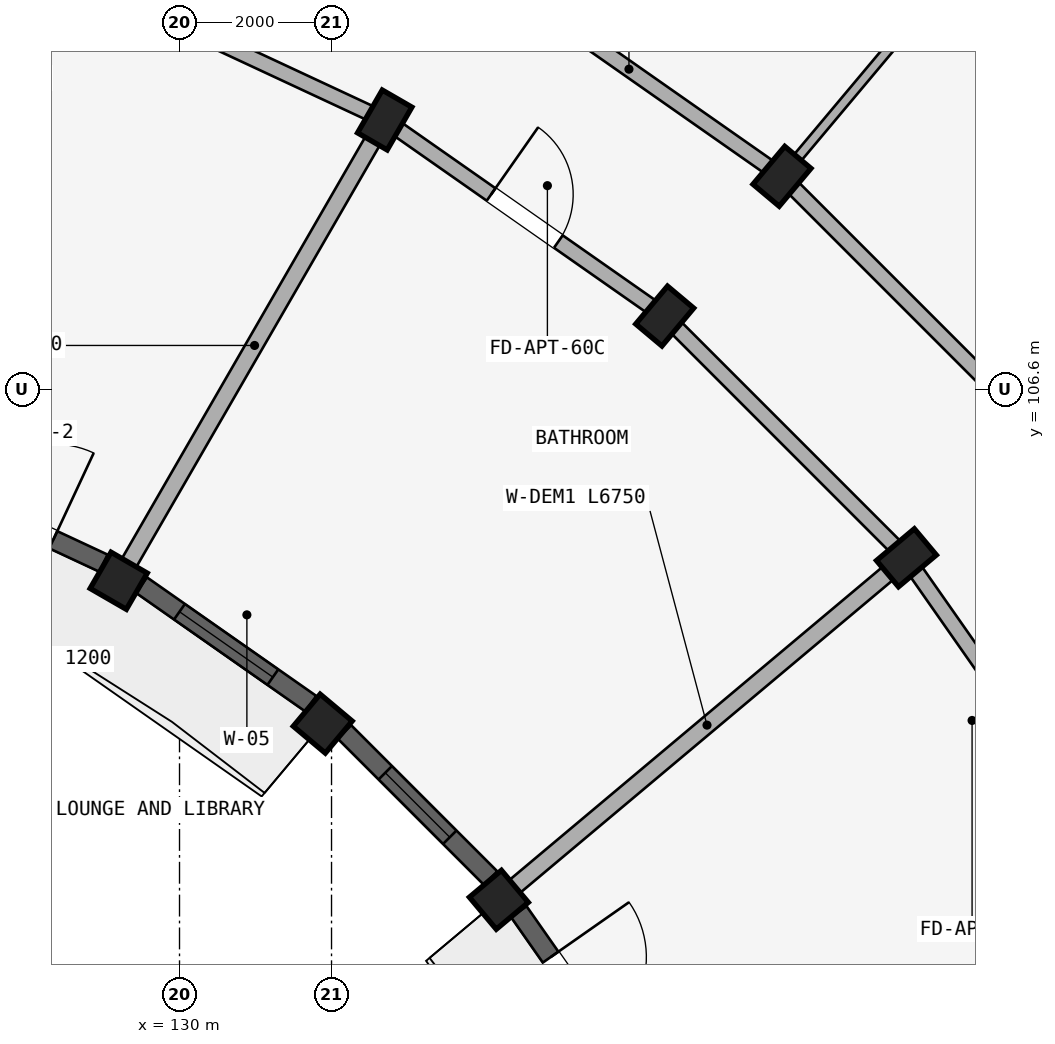
"""IFC4 building model, lengths in metres.
Left out: names, types, materials, properties, quantities, classifications, styles, units other than length and angle.
Written with IfcOpenShell. Run it as: python <this file> out.ifc"""

import sys

from ifc_helpers import new_model, si_unit, direction, frame, frame_2d, origin, origin_2d, place, context, subcontext, project, spatial, rectangle, extrude, element, fill, save


model = new_model("IFC4")
c1 = context("Model", 3, precision=1e-05, world=origin(), true_north=direction((0.0, 1.0)))
c2 = subcontext(c1, "Body", "Model", "MODEL_VIEW")
j1 = project(units=[si_unit("LENGTHUNIT", "METRE"), si_unit("PLANEANGLEUNIT", "RADIAN")], contexts=[c1])
p1 = place(None, origin())
s1 = spatial("IfcSite", under=j1, at=p1, CompositionType="ELEMENT")
p2 = place(p1, origin())
s2 = spatial("IfcBuilding", under=s1, at=p2, CompositionType="ELEMENT")
p3 = place(p2, frame((0.0, 0.0, 33.9)))
s3 = spatial("IfcBuildingStorey", under=s2, at=p3, CompositionType="ELEMENT", Elevation=33.9)
p4 = place(p3, frame((129.2, 104.081, 0.0), z_axis=(0.0, 0.0, 1.0), x_axis=(-0.866025403784, 0.5, 0.0)))
e1 = element("IfcColumn", 1, at=p4, inside=s3, PredefinedType="COLUMN", context=c2, shape_type="SweptSolid", body=[
    extrude(rectangle(XDim=0.55, YDim=0.55, at=origin_2d()), origin(), (0.0, 0.0, 1.0), 2.93),
])
p5 = place(p3, frame((132.7, 110.144, 0.0), z_axis=(0.0, 0.0, 1.0), x_axis=(-0.866025403784, 0.5, 0.0)))
e2 = element("IfcColumn", 2, at=p5, inside=s3, PredefinedType="COLUMN", context=c2, shape_type="SweptSolid", body=[
    extrude(rectangle(XDim=0.45, YDim=0.65, at=origin_2d()), origin(), (0.0, 0.0, 1.0), 2.93),
])
p6 = place(p3, frame((131.885, 102.202, 0.0), z_axis=(0.0, 0.0, 1.0), x_axis=(-0.766044443119, 0.642787609687, 0.0)))
e3 = element("IfcColumn", 3, at=p6, inside=s3, PredefinedType="COLUMN", context=c2, shape_type="SweptSolid", body=[
    extrude(rectangle(XDim=0.55, YDim=0.55, at=origin_2d()), origin(), (0.0, 0.0, 1.0), 2.93),
])
for number, where, z_axis, x_axis in (
    (4, (136.384, 107.564, 0.0), (0.0, 0.0, 1.0), (-0.766, 0.643, 0.0)),
    (5, (137.927, 109.402, 0.0), (0.0, 0.0, 1.0), (-0.766, 0.643, 0.0)),
):
    element("IfcColumn", number, at=place(p3, frame(where, z_axis=z_axis, x_axis=x_axis)), inside=s3, PredefinedType="COLUMN", context=c2, shape_type="SweptSolid", body=[
        extrude(rectangle(XDim=0.45, YDim=0.65, at=origin_2d()), origin(), (0.0, 0.0, 1.0), 2.93),
    ])
p7 = place(p3, frame((134.202, 99.885, 0.0), z_axis=(0.0, 0.0, 1.0), x_axis=(-0.642787609687, 0.766044443119, 0.0)))
e6 = element("IfcColumn", 6, at=p7, inside=s3, PredefinedType="COLUMN", context=c2, shape_type="SweptSolid", body=[
    extrude(rectangle(XDim=0.55, YDim=0.55, at=origin_2d()), origin(), (0.0, 0.0, 1.0), 2.93),
])
p8 = place(p3, frame((139.564, 104.384, 0.0), z_axis=(0.0, 0.0, 1.0), x_axis=(-0.642787609687, 0.766044443119, 0.0)))
e7 = element("IfcColumn", 7, at=p8, inside=s3, PredefinedType="COLUMN", context=c2, shape_type="SweptSolid", body=[
    extrude(rectangle(XDim=0.45, YDim=0.65, at=origin_2d()), origin(), (0.0, 0.0, 1.0), 2.93),
])
p9 = place(p3, frame((128.624, 112.044, 0.0), z_axis=(0.0, 0.0, 1.0), x_axis=(0.906307919131, -0.422617978463, 0.0)))
e8 = element("IfcWall", 8, at=p9, inside=s3, PredefinedType="STANDARD", context=c2, shape_type="SweptSolid", body=[
    extrude(rectangle(XDim=4.497, YDim=0.2, at=frame_2d((2.249, 0.0))), origin(), (0.0, 0.0, 1.0), 2.372),
])
p10 = place(p3, frame((132.7, 110.144, 0.0), z_axis=(0.0, 0.0, 1.0), x_axis=(0.819155404658, -0.573571637217, 0.0)))
e9 = element("IfcWall", 9, at=p10, inside=s3, PredefinedType="STANDARD", context=c2, shape_type="SweptSolid", body=[
    extrude(rectangle(XDim=4.497, YDim=0.2, at=frame_2d((2.249, 0.0))), origin(), (0.0, 0.0, 1.0), 2.372),
])
p11 = place(p10, frame((1.709, 0.0, 0.0)))
e10 = element("IfcOpeningElement", 10, at=p11, cuts=e9, PredefinedType="OPENING", context=c2, shape_type="SweptSolid", body=[
    extrude(rectangle(XDim=1.08, YDim=2.15, at=frame_2d((0.54, 1.075))), frame((0.0, 0.11, 0.0), z_axis=(0.0, -1.0, 0.0), x_axis=(1.0, 0.0, 0.0)), (0.0, 0.0, 1.0), 0.22),
])
p12 = place(p3, frame((133.9, 112.222, 0.0), z_axis=(0.0, 0.0, 1.0), x_axis=(0.819140911474, -0.573592335331, 0.0)))
e11 = element("IfcWall", 11, at=p12, inside=s3, PredefinedType="STANDARD", context=c2, shape_type="SweptSolid", body=[
    extrude(rectangle(XDim=4.916, YDim=0.2, at=frame_2d((2.458, 0.0))), origin(), (0.0, 0.0, 1.0), 2.372),
])
p13 = place(p3, frame((136.384, 107.564, 0.0), z_axis=(0.0, 0.0, 1.0), x_axis=(0.707106781187, -0.707106781187, 0.0)))
e12 = element("IfcWall", 12, at=p13, inside=s3, PredefinedType="STANDARD", context=c2, shape_type="SweptSolid", body=[
    extrude(rectangle(XDim=4.497, YDim=0.2, at=frame_2d((2.249, 0.0))), origin(), (0.0, 0.0, 1.0), 2.372),
])
p14 = place(p3, frame((137.927, 109.402, 0.0), z_axis=(0.0, 0.0, 1.0), x_axis=(0.707106781187, -0.707106781187, 0.0)))
e13 = element("IfcWall", 13, at=p14, inside=s3, PredefinedType="STANDARD", context=c2, shape_type="SweptSolid", body=[
    extrude(rectangle(XDim=4.916, YDim=0.2, at=frame_2d((2.458, 0.0))), origin(), (0.0, 0.0, 1.0), 2.372),
])
p15 = place(p3, frame((139.564, 104.384, 0.0), z_axis=(0.0, 0.0, 1.0), x_axis=(0.573571637217, -0.819155404658, 0.0)))
e14 = element("IfcWall", 14, at=p15, inside=s3, PredefinedType="STANDARD", context=c2, shape_type="SweptSolid", body=[
    extrude(rectangle(XDim=4.497, YDim=0.2, at=frame_2d((2.249, 0.0))), origin(), (0.0, 0.0, 1.0), 2.372),
])
p16 = place(p15, frame((1.749, 0.0, 0.0)))
e15 = element("IfcOpeningElement", 15, at=p16, cuts=e14, PredefinedType="OPENING", context=c2, shape_type="SweptSolid", body=[
    extrude(rectangle(XDim=1.0, YDim=2.15, at=frame_2d((0.5, 1.075))), frame((0.0, 0.11, 0.0), z_axis=(0.0, -1.0, 0.0), x_axis=(1.0, 0.0, 0.0)), (0.0, 0.0, 1.0), 0.22),
])
p17 = place(p3, frame((129.3, 104.254, 0.0), z_axis=(0.0, 0.0, 1.0), x_axis=(0.499997969693, 0.866026575979, 0.0)))
e16 = element("IfcWall", 16, at=p17, inside=s3, PredefinedType="STANDARD", context=c2, shape_type="SweptSolid", body=[
    extrude(rectangle(XDim=6.75, YDim=0.22, at=frame_2d((3.375, 0.0))), origin(), (0.0, 0.0, 1.0), 2.372),
])
p18 = place(p3, frame((137.991, 109.479, 0.0), z_axis=(0.0, 0.0, 1.0), x_axis=(0.642781220531, 0.766049804211, 0.0)))
e17 = element("IfcWall", 17, at=p18, inside=s3, PredefinedType="PARTITIONING", context=c2, shape_type="SweptSolid", body=[
    extrude(rectangle(XDim=11.82, YDim=0.125, at=frame_2d((5.91, 0.0))), origin(), (0.0, 0.0, 1.0), 2.372),
])
p19 = place(p18, frame((7.5, 0.0, 0.0)))
e18 = element("IfcOpeningElement", 18, at=p19, cuts=e17, PredefinedType="OPENING", context=c2, shape_type="SweptSolid", body=[
    extrude(rectangle(XDim=0.8, YDim=2.1, at=frame_2d((0.4, 1.05))), frame((0.0, 0.073, 0.0), z_axis=(0.0, -1.0, 0.0), x_axis=(1.0, 0.0, 0.0)), (0.0, 0.0, 1.0), 0.145),
])
p20 = place(p3, frame((134.355, 100.013, 0.0), z_axis=(0.0, 0.0, 1.0), x_axis=(0.766046761698, 0.642784846501, 0.0)))
e19 = element("IfcWall", 19, at=p20, inside=s3, PredefinedType="STANDARD", context=c2, shape_type="SweptSolid", body=[
    extrude(rectangle(XDim=6.75, YDim=0.22, at=frame_2d((3.375, 0.0))), origin(), (0.0, 0.0, 1.0), 2.372),
])
p21 = place(p3, frame((140.08, 111.969, 0.0), z_axis=(0.0, 0.0, 1.0), x_axis=(0.707106781187, -0.707106781187, 0.0)))
e20 = element("IfcWall", 20, at=p21, inside=s3, PredefinedType="PLUMBINGWALL", context=c2, shape_type="SweptSolid", body=[
    extrude(rectangle(XDim=5.5, YDim=0.15, at=frame_2d((2.75, 0.0))), origin(), (0.0, 0.0, 1.0), 2.372),
])
p22 = place(p21, frame((2.37, 0.0, 0.0)))
e21 = element("IfcOpeningElement", 21, at=p22, cuts=e20, PredefinedType="OPENING", context=c2, shape_type="SweptSolid", body=[
    extrude(rectangle(XDim=0.76, YDim=2.05, at=frame_2d((0.38, 1.025))), frame((0.0, 0.085, 0.0), z_axis=(0.0, -1.0, 0.0), x_axis=(1.0, 0.0, 0.0)), (0.0, 0.0, 1.0), 0.17),
])
p23 = place(p3, frame((126.535, 105.462, 0.0), z_axis=(0.0, 0.0, 1.0), x_axis=(0.906302358412, -0.422629903269, 0.0)))
e22 = element("IfcWall", 22, at=p23, inside=s3, PredefinedType="STANDARD", context=c2, shape_type="SweptSolid", body=[
    extrude(rectangle(XDim=2.72, YDim=0.25, at=frame_2d((1.36, 0.0))), origin(), (0.0, 0.0, 1.0), 2.472),
])
p24 = place(p23, frame((0.73, 0.0, 0.0)))
e23 = element("IfcOpeningElement", 23, at=p24, cuts=e22, PredefinedType="OPENING", context=c2, shape_type="SweptSolid", body=[
    extrude(rectangle(XDim=1.26, YDim=2.15, at=frame_2d((0.63, 1.075))), frame((0.0, 0.135, 0.0), z_axis=(0.0, -1.0, 0.0), x_axis=(1.0, 0.0, 0.0)), (0.0, 0.0, 1.0), 0.27),
])
p25 = place(p3, frame((129.5, 104.024, 0.0), z_axis=(0.0, 0.0, 1.0), x_axis=(0.819126475299, -0.573612950921, 0.0)))
e24 = element("IfcWall", 24, at=p25, inside=s3, PredefinedType="STANDARD", context=c2, shape_type="SweptSolid", body=[
    extrude(rectangle(XDim=2.72, YDim=0.25, at=frame_2d((1.36, 0.0))), origin(), (0.0, 0.0, 1.0), 2.472),
])
p26 = place(p25, frame((0.61, 0.0, 0.622)))
e25 = element("IfcOpeningElement", 25, at=p26, cuts=e24, PredefinedType="OPENING", context=c2, shape_type="SweptSolid", body=[
    extrude(rectangle(XDim=1.5, YDim=1.65, at=frame_2d((0.75, 0.825))), frame((0.0, 0.135, 0.0), z_axis=(0.0, -1.0, 0.0), x_axis=(1.0, 0.0, 0.0)), (0.0, 0.0, 1.0), 0.27),
])
p27 = place(p3, frame((132.17, 102.093, 0.0), z_axis=(0.0, 0.0, 1.0), x_axis=(0.707106781187, -0.707106781187, 0.0)))
e26 = element("IfcWall", 26, at=p27, inside=s3, PredefinedType="STANDARD", context=c2, shape_type="SweptSolid", body=[
    extrude(rectangle(XDim=2.72, YDim=0.25, at=frame_2d((1.36, 0.0))), origin(), (0.0, 0.0, 1.0), 2.472),
])
p28 = place(p27, frame((0.76, 0.0, 0.772)))
e27 = element("IfcOpeningElement", 27, at=p28, cuts=e26, PredefinedType="OPENING", context=c2, shape_type="SweptSolid", body=[
    extrude(rectangle(XDim=1.2, YDim=1.5, at=frame_2d((0.6, 0.75))), frame((0.0, 0.135, 0.0), z_axis=(0.0, -1.0, 0.0), x_axis=(1.0, 0.0, 0.0)), (0.0, 0.0, 1.0), 0.27),
])
p29 = place(p3, frame((134.464, 99.728, 0.0), z_axis=(0.0, 0.0, 1.0), x_axis=(0.573612950921, -0.819126475299, 0.0)))
e28 = element("IfcWall", 28, at=p29, inside=s3, PredefinedType="STANDARD", context=c2, shape_type="SweptSolid", body=[
    extrude(rectangle(XDim=2.72, YDim=0.25, at=frame_2d((1.36, 0.0))), origin(), (0.0, 0.0, 1.0), 2.472),
])
p30 = place(p29, frame((0.73, 0.0, 0.0)))
e29 = element("IfcOpeningElement", 29, at=p30, cuts=e28, PredefinedType="OPENING", context=c2, shape_type="SweptSolid", body=[
    extrude(rectangle(XDim=1.26, YDim=2.15, at=frame_2d((0.63, 1.075))), frame((0.0, 0.135, 0.0), z_axis=(0.0, -1.0, 0.0), x_axis=(1.0, 0.0, 0.0)), (0.0, 0.0, 1.0), 0.27),
])
p31 = place(p26, origin())
e30 = element("IfcWindow", 30, at=p31, inside=s3, PartitioningType="DOUBLE_PANEL_VERTICAL", PredefinedType="WINDOW", context=c2, shape_type="SweptSolid", body=[
    extrude(rectangle(XDim=1.5, YDim=1.65, at=frame_2d((0.75, 0.825))), frame((0.0, 0.03, 0.0), z_axis=(0.0, -1.0, 0.0), x_axis=(1.0, 0.0, 0.0)), (0.0, 0.0, 1.0), 0.06),
])
fill(e25, e30)
p32 = place(p28, origin())
e31 = element("IfcWindow", 31, at=p32, inside=s3, PartitioningType="SINGLE_PANEL", PredefinedType="WINDOW", context=c2, shape_type="SweptSolid", body=[
    extrude(rectangle(XDim=1.2, YDim=1.5, at=frame_2d((0.6, 0.75))), frame((0.0, 0.03, 0.0), z_axis=(0.0, -1.0, 0.0), x_axis=(1.0, 0.0, 0.0)), (0.0, 0.0, 1.0), 0.06),
])
fill(e27, e31)
p33 = place(p11, frame((1.08, 0.0, 0.0), z_axis=(0.0, 0.0, 1.0), x_axis=(-1.0, 0.0, 0.0)))
e32 = element("IfcDoor", 32, at=p33, inside=s3, OperationType="SINGLE_SWING_RIGHT", PredefinedType="DOOR", context=c2, shape_type="SweptSolid", body=[
    extrude(rectangle(XDim=1.08, YDim=2.15, at=frame_2d((0.54, 1.075))), frame((0.0, 0.025, 0.0), z_axis=(0.0, -1.0, 0.0), x_axis=(1.0, 0.0, 0.0)), (0.0, 0.0, 1.0), 0.05),
])
fill(e10, e32)
p34 = place(p24, frame((1.26, 0.0, 0.0), z_axis=(0.0, 0.0, 1.0), x_axis=(-1.0, 0.0, 0.0)))
e33 = element("IfcDoor", 33, at=p34, inside=s3, OperationType="SINGLE_SWING_LEFT", PredefinedType="DOOR", context=c2, shape_type="SweptSolid", body=[
    extrude(rectangle(XDim=1.26, YDim=2.15, at=frame_2d((0.63, 1.075))), frame((0.0, 0.025, 0.0), z_axis=(0.0, -1.0, 0.0), x_axis=(1.0, 0.0, 0.0)), (0.0, 0.0, 1.0), 0.05),
])
fill(e23, e33)
p35 = place(p30, frame((1.26, 0.0, 0.0), z_axis=(0.0, 0.0, 1.0), x_axis=(-1.0, 0.0, 0.0)))
e34 = element("IfcDoor", 34, at=p35, inside=s3, OperationType="SINGLE_SWING_RIGHT", PredefinedType="DOOR", context=c2, shape_type="SweptSolid", body=[
    extrude(rectangle(XDim=1.26, YDim=2.15, at=frame_2d((0.63, 1.075))), frame((0.0, 0.025, 0.0), z_axis=(0.0, -1.0, 0.0), x_axis=(1.0, 0.0, 0.0)), (0.0, 0.0, 1.0), 0.05),
])
fill(e29, e34)
save(model, sys.argv[1])
